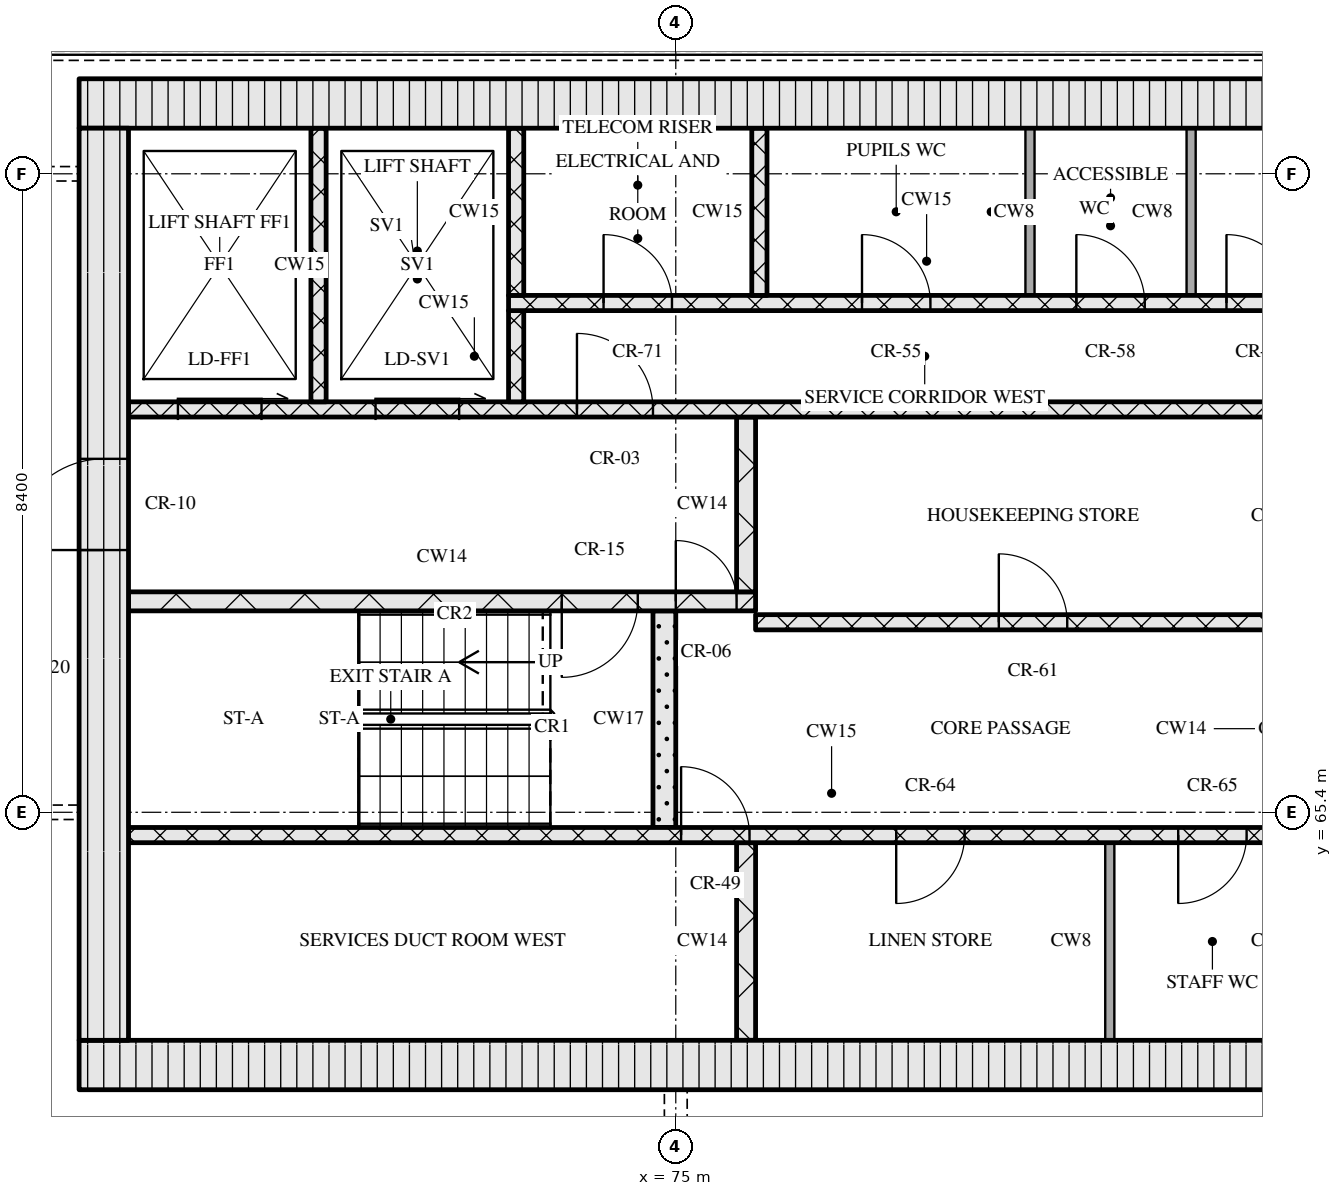
"""IFC4 building model, lengths in metres.
Left out: names, types, materials, properties, quantities, classifications, styles, units other than length and angle.
Written with IfcOpenShell. Run it as: python <this file> out.ifc"""

import sys

from ifc_helpers import new_model, si_unit, direction, frame, frame_2d, origin, place, context, subcontext, project, spatial, rectangle, extrude, element, fill, save


model = new_model("IFC4")
c1 = context("Model", 3, precision=1e-05, world=origin(), true_north=direction((0.0, 1.0)))
c2 = subcontext(c1, "Body", "Model", "MODEL_VIEW")
j1 = project(units=[si_unit("LENGTHUNIT", "METRE"), si_unit("PLANEANGLEUNIT", "RADIAN")], contexts=[c1])
p1 = place(None, origin())
s1 = spatial("IfcSite", under=j1, at=p1, CompositionType="ELEMENT")
p2 = place(p1, origin())
s2 = spatial("IfcBuilding", under=s1, at=p2, CompositionType="ELEMENT")
p3 = place(p2, frame((0.0, 0.0, 223.5)))
s3 = spatial("IfcBuildingStorey", under=s2, at=p3, CompositionType="ELEMENT", Elevation=223.5)
p4 = place(p3, frame((67.15, 62.075, 0.0), z_axis=(0.0, 0.0, 1.0), x_axis=(1.0, 0.0, 0.0)))
e1 = element("IfcWall", 1, at=p4, inside=s3, PredefinedType="SOLIDWALL", context=c2, shape_type="SweptSolid", body=[
    extrude(rectangle(XDim=40.9, YDim=0.65, at=frame_2d((20.45, 0.0))), origin(), (0.0, 0.0, 1.0), 3.32),
])
p5 = place(p4, frame((20.8, 0.0, 0.0)))
e2 = element("IfcOpeningElement", 2, at=p5, cuts=e1, PredefinedType="OPENING", context=c2, shape_type="SweptSolid", body=[
    extrude(rectangle(XDim=1.8, YDim=2.1, at=frame_2d((0.9, 1.05))), frame((0.0, 0.335, 0.0), z_axis=(0.0, -1.0, 0.0), x_axis=(1.0, 0.0, 0.0)), (0.0, 0.0, 1.0), 0.67),
])
p6 = place(p3, frame((67.15, 74.725, 0.0), z_axis=(0.0, 0.0, 1.0), x_axis=(1.0, 0.0, 0.0)))
e3 = element("IfcWall", 3, at=p6, inside=s3, PredefinedType="SOLIDWALL", context=c2, shape_type="SweptSolid", body=[
    extrude(rectangle(XDim=40.9, YDim=0.65, at=frame_2d((20.45, 0.0))), origin(), (0.0, 0.0, 1.0), 3.32),
])
p7 = place(p3, frame((67.475, 62.4, 0.0), z_axis=(0.0, 0.0, 1.0), x_axis=(0.0, 1.0, 0.0)))
e4 = element("IfcWall", 4, at=p7, inside=s3, PredefinedType="SOLIDWALL", context=c2, shape_type="SweptSolid", body=[
    extrude(rectangle(XDim=12.0, YDim=0.65, at=frame_2d((6.0, 0.0))), origin(), (0.0, 0.0, 1.0), 3.32),
])
p8 = place(p7, frame((6.45, 0.0, 0.0)))
e5 = element("IfcOpeningElement", 5, at=p8, cuts=e4, PredefinedType="OPENING", context=c2, shape_type="SweptSolid", body=[
    extrude(rectangle(XDim=1.2, YDim=2.1, at=frame_2d((0.6, 1.05))), frame((0.0, 0.335, 0.0), z_axis=(0.0, -1.0, 0.0), x_axis=(1.0, 0.0, 0.0)), (0.0, 0.0, 1.0), 0.67),
])
p9 = place(p3, frame((75.925, 62.4, 0.0), z_axis=(0.0, 0.0, 1.0), x_axis=(0.0, 1.0, 0.0)))
e6 = element("IfcWall", 6, at=p9, inside=s3, PredefinedType="SOLIDWALL", context=c2, shape_type="SweptSolid", body=[
    extrude(rectangle(XDim=2.6, YDim=0.25, at=frame_2d((1.3, 0.0))), origin(), (0.0, 0.0, 1.0), 3.32),
])
p10 = place(p3, frame((80.71, 62.4, 0.0), z_axis=(0.0, 0.0, 1.0), x_axis=(0.0, 1.0, 0.0)))
e7 = element("IfcWall", 7, at=p10, inside=s3, PredefinedType="PARTITIONING", context=c2, shape_type="SweptSolid", body=[
    extrude(rectangle(XDim=2.6, YDim=0.12, at=frame_2d((1.3, 0.0))), origin(), (0.0, 0.0, 1.0), 3.32),
])
p11 = place(p3, frame((67.8, 65.1, 0.0), z_axis=(0.0, 0.0, 1.0), x_axis=(1.0, 0.0, 0.0)))
e8 = element("IfcWall", 8, at=p11, inside=s3, PredefinedType="SOLIDWALL", context=c2, shape_type="SweptSolid", body=[
    extrude(rectangle(XDim=18.5, YDim=0.2, at=frame_2d((9.25, 0.0))), origin(), (0.0, 0.0, 1.0), 3.32),
])
p12 = place(p11, frame((7.27, 0.0, 0.0)))
e9 = element("IfcOpeningElement", 9, at=p12, cuts=e8, PredefinedType="OPENING", context=c2, shape_type="SweptSolid", body=[
    extrude(rectangle(XDim=0.9, YDim=2.1, at=frame_2d((0.45, 1.05))), frame((0.0, 0.11, 0.0), z_axis=(0.0, -1.0, 0.0), x_axis=(1.0, 0.0, 0.0)), (0.0, 0.0, 1.0), 0.22),
])
p13 = place(p11, frame((10.1, 0.0, 0.0)))
e10 = element("IfcOpeningElement", 10, at=p13, cuts=e8, PredefinedType="OPENING", context=c2, shape_type="SweptSolid", body=[
    extrude(rectangle(XDim=0.9, YDim=2.1, at=frame_2d((0.45, 1.05))), frame((0.0, 0.11, 0.0), z_axis=(0.0, -1.0, 0.0), x_axis=(1.0, 0.0, 0.0)), (0.0, 0.0, 1.0), 0.22),
])
p14 = place(p11, frame((13.81, 0.0, 0.0)))
e11 = element("IfcOpeningElement", 11, at=p14, cuts=e8, PredefinedType="OPENING", context=c2, shape_type="SweptSolid", body=[
    extrude(rectangle(XDim=0.9, YDim=2.1, at=frame_2d((0.45, 1.05))), frame((0.0, 0.11, 0.0), z_axis=(0.0, -1.0, 0.0), x_axis=(1.0, 0.0, 0.0)), (0.0, 0.0, 1.0), 0.22),
])
p15 = place(p11, frame((16.7, 0.0, 0.0)))
e12 = element("IfcOpeningElement", 12, at=p15, cuts=e8, PredefinedType="OPENING", context=c2, shape_type="SweptSolid", body=[
    extrude(rectangle(XDim=0.9, YDim=2.1, at=frame_2d((0.45, 1.05))), frame((0.0, 0.11, 0.0), z_axis=(0.0, -1.0, 0.0), x_axis=(1.0, 0.0, 0.0)), (0.0, 0.0, 1.0), 0.22),
])
p16 = place(p3, frame((74.85, 65.2, 0.0), z_axis=(0.0, 0.0, 1.0), x_axis=(0.0, 1.0, 0.0)))
e13 = element("IfcWall", 13, at=p16, inside=s3, PredefinedType="SOLIDWALL", context=c2, shape_type="SweptSolid", body=[
    extrude(rectangle(XDim=2.85, YDim=0.3, at=frame_2d((1.425, 0.0))), origin(), (0.0, 0.0, 1.0), 3.32),
])
p17 = place(p3, frame((76.05, 67.9, 0.0), z_axis=(0.0, 0.0, 1.0), x_axis=(1.0, 0.0, 0.0)))
e14 = element("IfcWall", 14, at=p17, inside=s3, PredefinedType="SOLIDWALL", context=c2, shape_type="SweptSolid", body=[
    extrude(rectangle(XDim=23.1, YDim=0.2, at=frame_2d((11.55, 0.0))), origin(), (0.0, 0.0, 1.0), 3.32),
])
p18 = place(p17, frame((3.2, 0.0, 0.0)))
e15 = element("IfcOpeningElement", 15, at=p18, cuts=e14, PredefinedType="OPENING", context=c2, shape_type="SweptSolid", body=[
    extrude(rectangle(XDim=0.9, YDim=2.1, at=frame_2d((0.45, 1.05))), frame((0.0, 0.11, 0.0), z_axis=(0.0, -1.0, 0.0), x_axis=(1.0, 0.0, 0.0)), (0.0, 0.0, 1.0), 0.22),
])
p19 = place(p17, frame((9.7, 0.0, 0.0)))
e16 = element("IfcOpeningElement", 16, at=p19, cuts=e14, PredefinedType="OPENING", context=c2, shape_type="SweptSolid", body=[
    extrude(rectangle(XDim=0.9, YDim=2.1, at=frame_2d((0.45, 1.05))), frame((0.0, 0.11, 0.0), z_axis=(0.0, -1.0, 0.0), x_axis=(1.0, 0.0, 0.0)), (0.0, 0.0, 1.0), 0.22),
])
p20 = place(p17, frame((13.55, 0.0, 0.0)))
e17 = element("IfcOpeningElement", 17, at=p20, cuts=e14, PredefinedType="OPENING", context=c2, shape_type="SweptSolid", body=[
    extrude(rectangle(XDim=1.0, YDim=2.1, at=frame_2d((0.5, 1.05))), frame((0.0, 0.11, 0.0), z_axis=(0.0, -1.0, 0.0), x_axis=(1.0, 0.0, 0.0)), (0.0, 0.0, 1.0), 0.22),
])
p21 = place(p17, frame((16.2, 0.0, 0.0)))
e18 = element("IfcOpeningElement", 18, at=p21, cuts=e14, PredefinedType="OPENING", context=c2, shape_type="SweptSolid", body=[
    extrude(rectangle(XDim=1.1, YDim=2.1, at=frame_2d((0.55, 1.05))), frame((0.0, 0.11, 0.0), z_axis=(0.0, -1.0, 0.0), x_axis=(1.0, 0.0, 0.0)), (0.0, 0.0, 1.0), 0.22),
])
p22 = place(p17, frame((18.7, 0.0, 0.0)))
e19 = element("IfcOpeningElement", 19, at=p22, cuts=e14, PredefinedType="OPENING", context=c2, shape_type="SweptSolid", body=[
    extrude(rectangle(XDim=1.1, YDim=2.1, at=frame_2d((0.55, 1.05))), frame((0.0, 0.11, 0.0), z_axis=(0.0, -1.0, 0.0), x_axis=(1.0, 0.0, 0.0)), (0.0, 0.0, 1.0), 0.22),
])
p23 = place(p17, frame((21.2, 0.0, 0.0)))
e20 = element("IfcOpeningElement", 20, at=p23, cuts=e14, PredefinedType="OPENING", context=c2, shape_type="SweptSolid", body=[
    extrude(rectangle(XDim=1.1, YDim=2.1, at=frame_2d((0.55, 1.05))), frame((0.0, 0.11, 0.0), z_axis=(0.0, -1.0, 0.0), x_axis=(1.0, 0.0, 0.0)), (0.0, 0.0, 1.0), 0.22),
])
p24 = place(p3, frame((67.8, 68.175, 0.0), z_axis=(0.0, 0.0, 1.0), x_axis=(1.0, 0.0, 0.0)))
e21 = element("IfcWall", 21, at=p24, inside=s3, PredefinedType="SOLIDWALL", context=c2, shape_type="SweptSolid", body=[
    extrude(rectangle(XDim=8.25, YDim=0.25, at=frame_2d((4.125, 0.0))), origin(), (0.0, 0.0, 1.0), 3.32),
])
p25 = place(p24, frame((5.7, 0.0, 0.0)))
e22 = element("IfcOpeningElement", 22, at=p25, cuts=e21, PredefinedType="OPENING", context=c2, shape_type="SweptSolid", body=[
    extrude(rectangle(XDim=1.0, YDim=2.1, at=frame_2d((0.5, 1.05))), frame((0.0, 0.135, 0.0), z_axis=(0.0, -1.0, 0.0), x_axis=(1.0, 0.0, 0.0)), (0.0, 0.0, 1.0), 0.27),
])
p26 = place(p24, frame((7.2, 0.0, 0.0)))
e23 = element("IfcOpeningElement", 23, at=p26, cuts=e21, PredefinedType="OPENING", context=c2, shape_type="SweptSolid", body=[
    extrude(rectangle(XDim=0.8, YDim=2.1, at=frame_2d((0.4, 1.05))), frame((0.0, 0.135, 0.0), z_axis=(0.0, -1.0, 0.0), x_axis=(1.0, 0.0, 0.0)), (0.0, 0.0, 1.0), 0.27),
])
p27 = place(p3, frame((75.925, 68.3, 0.0), z_axis=(0.0, 0.0, 1.0), x_axis=(0.0, 1.0, 0.0)))
e24 = element("IfcWall", 24, at=p27, inside=s3, PredefinedType="SOLIDWALL", context=c2, shape_type="SweptSolid", body=[
    extrude(rectangle(XDim=2.3, YDim=0.25, at=frame_2d((1.15, 0.0))), origin(), (0.0, 0.0, 1.0), 3.32),
])
p28 = place(p3, frame((67.8, 70.7, 0.0), z_axis=(0.0, 0.0, 1.0), x_axis=(1.0, 0.0, 0.0)))
e25 = element("IfcWall", 25, at=p28, inside=s3, PredefinedType="SOLIDWALL", context=c2, shape_type="SweptSolid", body=[
    extrude(rectangle(XDim=39.6, YDim=0.2, at=frame_2d((19.8, 0.0))), origin(), (0.0, 0.0, 1.0), 3.32),
])
p29 = place(p28, frame((0.65, 0.0, 0.0)))
e26 = element("IfcOpeningElement", 26, at=p29, cuts=e25, PredefinedType="OPENING", context=c2, shape_type="SweptSolid", body=[
    extrude(rectangle(XDim=1.1, YDim=2.1, at=frame_2d((0.55, 1.05))), frame((0.0, 0.11, 0.0), z_axis=(0.0, -1.0, 0.0), x_axis=(1.0, 0.0, 0.0)), (0.0, 0.0, 1.0), 0.22),
])
p30 = place(p28, frame((3.25, 0.0, 0.0)))
e27 = element("IfcOpeningElement", 27, at=p30, cuts=e25, PredefinedType="OPENING", context=c2, shape_type="SweptSolid", body=[
    extrude(rectangle(XDim=1.1, YDim=2.1, at=frame_2d((0.55, 1.05))), frame((0.0, 0.11, 0.0), z_axis=(0.0, -1.0, 0.0), x_axis=(1.0, 0.0, 0.0)), (0.0, 0.0, 1.0), 0.22),
])
p31 = place(p28, frame((5.9, 0.0, 0.0)))
e28 = element("IfcOpeningElement", 28, at=p31, cuts=e25, PredefinedType="OPENING", context=c2, shape_type="SweptSolid", body=[
    extrude(rectangle(XDim=1.0, YDim=2.1, at=frame_2d((0.5, 1.05))), frame((0.0, 0.11, 0.0), z_axis=(0.0, -1.0, 0.0), x_axis=(1.0, 0.0, 0.0)), (0.0, 0.0, 1.0), 0.22),
])
p32 = place(p28, frame((21.7, 0.0, 0.0)))
e29 = element("IfcOpeningElement", 29, at=p32, cuts=e25, PredefinedType="OPENING", context=c2, shape_type="SweptSolid", body=[
    extrude(rectangle(XDim=1.0, YDim=2.1, at=frame_2d((0.5, 1.05))), frame((0.0, 0.11, 0.0), z_axis=(0.0, -1.0, 0.0), x_axis=(1.0, 0.0, 0.0)), (0.0, 0.0, 1.0), 0.22),
])
p33 = place(p28, frame((32.7, 0.0, 0.0)))
e30 = element("IfcOpeningElement", 30, at=p33, cuts=e25, PredefinedType="OPENING", context=c2, shape_type="SweptSolid", body=[
    extrude(rectangle(XDim=1.0, YDim=2.1, at=frame_2d((0.5, 1.05))), frame((0.0, 0.11, 0.0), z_axis=(0.0, -1.0, 0.0), x_axis=(1.0, 0.0, 0.0)), (0.0, 0.0, 1.0), 0.22),
])
p34 = place(p28, frame((35.25, 0.0, 0.0)))
e31 = element("IfcOpeningElement", 31, at=p34, cuts=e25, PredefinedType="OPENING", context=c2, shape_type="SweptSolid", body=[
    extrude(rectangle(XDim=1.1, YDim=2.1, at=frame_2d((0.55, 1.05))), frame((0.0, 0.11, 0.0), z_axis=(0.0, -1.0, 0.0), x_axis=(1.0, 0.0, 0.0)), (0.0, 0.0, 1.0), 0.22),
])
p35 = place(p28, frame((37.85, 0.0, 0.0)))
e32 = element("IfcOpeningElement", 32, at=p35, cuts=e25, PredefinedType="OPENING", context=c2, shape_type="SweptSolid", body=[
    extrude(rectangle(XDim=1.1, YDim=2.1, at=frame_2d((0.55, 1.05))), frame((0.0, 0.11, 0.0), z_axis=(0.0, -1.0, 0.0), x_axis=(1.0, 0.0, 0.0)), (0.0, 0.0, 1.0), 0.22),
])
p36 = place(p3, frame((70.3, 70.8, 0.0), z_axis=(0.0, 0.0, 1.0), x_axis=(0.0, 1.0, 0.0)))
e33 = element("IfcWall", 33, at=p36, inside=s3, PredefinedType="SOLIDWALL", context=c2, shape_type="SweptSolid", body=[
    extrude(rectangle(XDim=3.6, YDim=0.2, at=frame_2d((1.8, 0.0))), origin(), (0.0, 0.0, 1.0), 3.32),
])
p37 = place(p3, frame((72.9, 70.8, 0.0), z_axis=(0.0, 0.0, 1.0), x_axis=(0.0, 1.0, 0.0)))
e34 = element("IfcWall", 34, at=p37, inside=s3, PredefinedType="SOLIDWALL", context=c2, shape_type="SweptSolid", body=[
    extrude(rectangle(XDim=1.2, YDim=0.2, at=frame_2d((0.6, 0.0))), origin(), (0.0, 0.0, 1.0), 3.32),
])
p38 = place(p3, frame((72.8, 72.1, 0.0), z_axis=(0.0, 0.0, 1.0), x_axis=(1.0, 0.0, 0.0)))
e35 = element("IfcWall", 35, at=p38, inside=s3, PredefinedType="SOLIDWALL", context=c2, shape_type="SweptSolid", body=[
    extrude(rectangle(XDim=11.0, YDim=0.2, at=frame_2d((5.5, 0.0))), origin(), (0.0, 0.0, 1.0), 3.32),
])
p39 = place(p38, frame((1.25, 0.0, 0.0)))
e36 = element("IfcOpeningElement", 36, at=p39, cuts=e35, PredefinedType="OPENING", context=c2, shape_type="SweptSolid", body=[
    extrude(rectangle(XDim=0.9, YDim=2.1, at=frame_2d((0.45, 1.05))), frame((0.0, 0.11, 0.0), z_axis=(0.0, -1.0, 0.0), x_axis=(1.0, 0.0, 0.0)), (0.0, 0.0, 1.0), 0.22),
])
p40 = place(p38, frame((4.65, 0.0, 0.0)))
e37 = element("IfcOpeningElement", 37, at=p40, cuts=e35, PredefinedType="OPENING", context=c2, shape_type="SweptSolid", body=[
    extrude(rectangle(XDim=0.9, YDim=2.1, at=frame_2d((0.45, 1.05))), frame((0.0, 0.11, 0.0), z_axis=(0.0, -1.0, 0.0), x_axis=(1.0, 0.0, 0.0)), (0.0, 0.0, 1.0), 0.22),
])
p41 = place(p38, frame((7.47, 0.0, 0.0)))
e38 = element("IfcOpeningElement", 38, at=p41, cuts=e35, PredefinedType="OPENING", context=c2, shape_type="SweptSolid", body=[
    extrude(rectangle(XDim=0.9, YDim=2.1, at=frame_2d((0.45, 1.05))), frame((0.0, 0.11, 0.0), z_axis=(0.0, -1.0, 0.0), x_axis=(1.0, 0.0, 0.0)), (0.0, 0.0, 1.0), 0.22),
])
p42 = place(p38, frame((9.445, 0.0, 0.0)))
e39 = element("IfcOpeningElement", 39, at=p42, cuts=e35, PredefinedType="OPENING", context=c2, shape_type="SweptSolid", body=[
    extrude(rectangle(XDim=0.9, YDim=2.1, at=frame_2d((0.45, 1.05))), frame((0.0, 0.11, 0.0), z_axis=(0.0, -1.0, 0.0), x_axis=(1.0, 0.0, 0.0)), (0.0, 0.0, 1.0), 0.22),
])
for number, where, z_axis, x_axis in (
    (40, (72.9, 72.2, 0.0), (0.0, 0.0, 1.0), (0.0, 1.0, 0.0)),
    (41, (76.1, 72.2, 0.0), (0.0, 0.0, 1.0), (0.0, 1.0, 0.0)),
):
    element("IfcWall", number, at=place(p3, frame(where, z_axis=z_axis, x_axis=x_axis)), inside=s3, PredefinedType="SOLIDWALL", context=c2, shape_type="SweptSolid", body=[
        extrude(rectangle(XDim=2.2, YDim=0.2, at=frame_2d((1.1, 0.0))), origin(), (0.0, 0.0, 1.0), 3.32),
    ])
for number, where, z_axis, x_axis in (
    (42, (79.66, 72.2, 0.0), (0.0, 0.0, 1.0), (0.0, 1.0, 0.0)),
    (43, (81.78, 72.2, 0.0), (0.0, 0.0, 1.0), (0.0, 1.0, 0.0)),
):
    element("IfcWall", number, at=place(p3, frame(where, z_axis=z_axis, x_axis=x_axis)), inside=s3, PredefinedType="PARTITIONING", context=c2, shape_type="SweptSolid", body=[
        extrude(rectangle(XDim=2.2, YDim=0.12, at=frame_2d((1.1, 0.0))), origin(), (0.0, 0.0, 1.0), 3.32),
    ])
p43 = place(p12, origin())
e44 = element("IfcDoor", 44, at=p43, inside=s3, OperationType="SINGLE_SWING_LEFT", PredefinedType="DOOR", context=c2, shape_type="SweptSolid", body=[
    extrude(rectangle(XDim=0.9, YDim=2.1, at=frame_2d((0.45, 1.05))), frame((0.0, 0.025, 0.0), z_axis=(0.0, -1.0, 0.0), x_axis=(1.0, 0.0, 0.0)), (0.0, 0.0, 1.0), 0.05),
])
fill(e9, e44)
p44 = place(p13, origin())
e45 = element("IfcDoor", 45, at=p44, inside=s3, OperationType="SINGLE_SWING_RIGHT", PredefinedType="DOOR", context=c2, shape_type="SweptSolid", body=[
    extrude(rectangle(XDim=0.9, YDim=2.1, at=frame_2d((0.45, 1.05))), frame((0.0, 0.025, 0.0), z_axis=(0.0, -1.0, 0.0), x_axis=(1.0, 0.0, 0.0)), (0.0, 0.0, 1.0), 0.05),
])
fill(e10, e45)
p45 = place(p14, origin())
e46 = element("IfcDoor", 46, at=p45, inside=s3, OperationType="SINGLE_SWING_RIGHT", PredefinedType="DOOR", context=c2, shape_type="SweptSolid", body=[
    extrude(rectangle(XDim=0.9, YDim=2.1, at=frame_2d((0.45, 1.05))), frame((0.0, 0.025, 0.0), z_axis=(0.0, -1.0, 0.0), x_axis=(1.0, 0.0, 0.0)), (0.0, 0.0, 1.0), 0.05),
])
fill(e11, e46)
p46 = place(p18, origin())
e47 = element("IfcDoor", 47, at=p46, inside=s3, OperationType="SINGLE_SWING_LEFT", PredefinedType="DOOR", context=c2, shape_type="SweptSolid", body=[
    extrude(rectangle(XDim=0.9, YDim=2.1, at=frame_2d((0.45, 1.05))), frame((0.0, 0.025, 0.0), z_axis=(0.0, -1.0, 0.0), x_axis=(1.0, 0.0, 0.0)), (0.0, 0.0, 1.0), 0.05),
])
fill(e15, e47)
p47 = place(p25, origin())
e48 = element("IfcDoor", 48, at=p47, inside=s3, OperationType="SINGLE_SWING_RIGHT", PredefinedType="DOOR", context=c2, shape_type="SweptSolid", body=[
    extrude(rectangle(XDim=1.0, YDim=2.1, at=frame_2d((0.5, 1.05))), frame((0.0, 0.025, 0.0), z_axis=(0.0, -1.0, 0.0), x_axis=(1.0, 0.0, 0.0)), (0.0, 0.0, 1.0), 0.05),
])
fill(e22, e48)
p48 = place(p26, origin())
e49 = element("IfcDoor", 49, at=p48, inside=s3, OperationType="SINGLE_SWING_LEFT", PredefinedType="DOOR", context=c2, shape_type="SweptSolid", body=[
    extrude(rectangle(XDim=0.8, YDim=2.1, at=frame_2d((0.4, 1.05))), frame((0.0, 0.025, 0.0), z_axis=(0.0, -1.0, 0.0), x_axis=(1.0, 0.0, 0.0)), (0.0, 0.0, 1.0), 0.05),
])
fill(e23, e49)
p49 = place(p8, origin())
e50 = element("IfcDoor", 50, at=p49, inside=s3, OperationType="SINGLE_SWING_LEFT", PredefinedType="DOOR", context=c2, shape_type="SweptSolid", body=[
    extrude(rectangle(XDim=1.2, YDim=2.1, at=frame_2d((0.6, 1.05))), frame((0.0, 0.025, 0.0), z_axis=(0.0, -1.0, 0.0), x_axis=(1.0, 0.0, 0.0)), (0.0, 0.0, 1.0), 0.05),
])
fill(e5, e50)
p50 = place(p29, origin())
e51 = element("IfcDoor", 51, at=p50, inside=s3, OperationType="SLIDING_TO_RIGHT", PredefinedType="DOOR", context=c2, shape_type="SweptSolid", body=[
    extrude(rectangle(XDim=1.1, YDim=2.1, at=frame_2d((0.55, 1.05))), frame((0.0, 0.025, 0.0), z_axis=(0.0, -1.0, 0.0), x_axis=(1.0, 0.0, 0.0)), (0.0, 0.0, 1.0), 0.05),
])
fill(e26, e51)
p51 = place(p30, origin())
e52 = element("IfcDoor", 52, at=p51, inside=s3, OperationType="SLIDING_TO_RIGHT", PredefinedType="DOOR", context=c2, shape_type="SweptSolid", body=[
    extrude(rectangle(XDim=1.1, YDim=2.1, at=frame_2d((0.55, 1.05))), frame((0.0, 0.025, 0.0), z_axis=(0.0, -1.0, 0.0), x_axis=(1.0, 0.0, 0.0)), (0.0, 0.0, 1.0), 0.05),
])
fill(e27, e52)
p52 = place(p31, origin())
e53 = element("IfcDoor", 53, at=p52, inside=s3, OperationType="SINGLE_SWING_LEFT", PredefinedType="DOOR", context=c2, shape_type="SweptSolid", body=[
    extrude(rectangle(XDim=1.0, YDim=2.1, at=frame_2d((0.5, 1.05))), frame((0.0, 0.025, 0.0), z_axis=(0.0, -1.0, 0.0), x_axis=(1.0, 0.0, 0.0)), (0.0, 0.0, 1.0), 0.05),
])
fill(e28, e53)
p53 = place(p39, origin())
e54 = element("IfcDoor", 54, at=p53, inside=s3, OperationType="SINGLE_SWING_LEFT", PredefinedType="DOOR", context=c2, shape_type="SweptSolid", body=[
    extrude(rectangle(XDim=0.9, YDim=2.1, at=frame_2d((0.45, 1.05))), frame((0.0, 0.025, 0.0), z_axis=(0.0, -1.0, 0.0), x_axis=(1.0, 0.0, 0.0)), (0.0, 0.0, 1.0), 0.05),
])
fill(e36, e54)
p54 = place(p40, origin())
e55 = element("IfcDoor", 55, at=p54, inside=s3, OperationType="SINGLE_SWING_LEFT", PredefinedType="DOOR", context=c2, shape_type="SweptSolid", body=[
    extrude(rectangle(XDim=0.9, YDim=2.1, at=frame_2d((0.45, 1.05))), frame((0.0, 0.025, 0.0), z_axis=(0.0, -1.0, 0.0), x_axis=(1.0, 0.0, 0.0)), (0.0, 0.0, 1.0), 0.05),
])
fill(e37, e55)
p55 = place(p41, origin())
e56 = element("IfcDoor", 56, at=p55, inside=s3, OperationType="SINGLE_SWING_LEFT", PredefinedType="DOOR", context=c2, shape_type="SweptSolid", body=[
    extrude(rectangle(XDim=0.9, YDim=2.1, at=frame_2d((0.45, 1.05))), frame((0.0, 0.025, 0.0), z_axis=(0.0, -1.0, 0.0), x_axis=(1.0, 0.0, 0.0)), (0.0, 0.0, 1.0), 0.05),
])
fill(e38, e56)
p56 = place(p42, origin())
e57 = element("IfcDoor", 57, at=p56, inside=s3, OperationType="SINGLE_SWING_LEFT", PredefinedType="DOOR", context=c2, shape_type="SweptSolid", body=[
    extrude(rectangle(XDim=0.9, YDim=2.1, at=frame_2d((0.45, 1.05))), frame((0.0, 0.025, 0.0), z_axis=(0.0, -1.0, 0.0), x_axis=(1.0, 0.0, 0.0)), (0.0, 0.0, 1.0), 0.05),
])
fill(e39, e57)
save(model, sys.argv[1])
